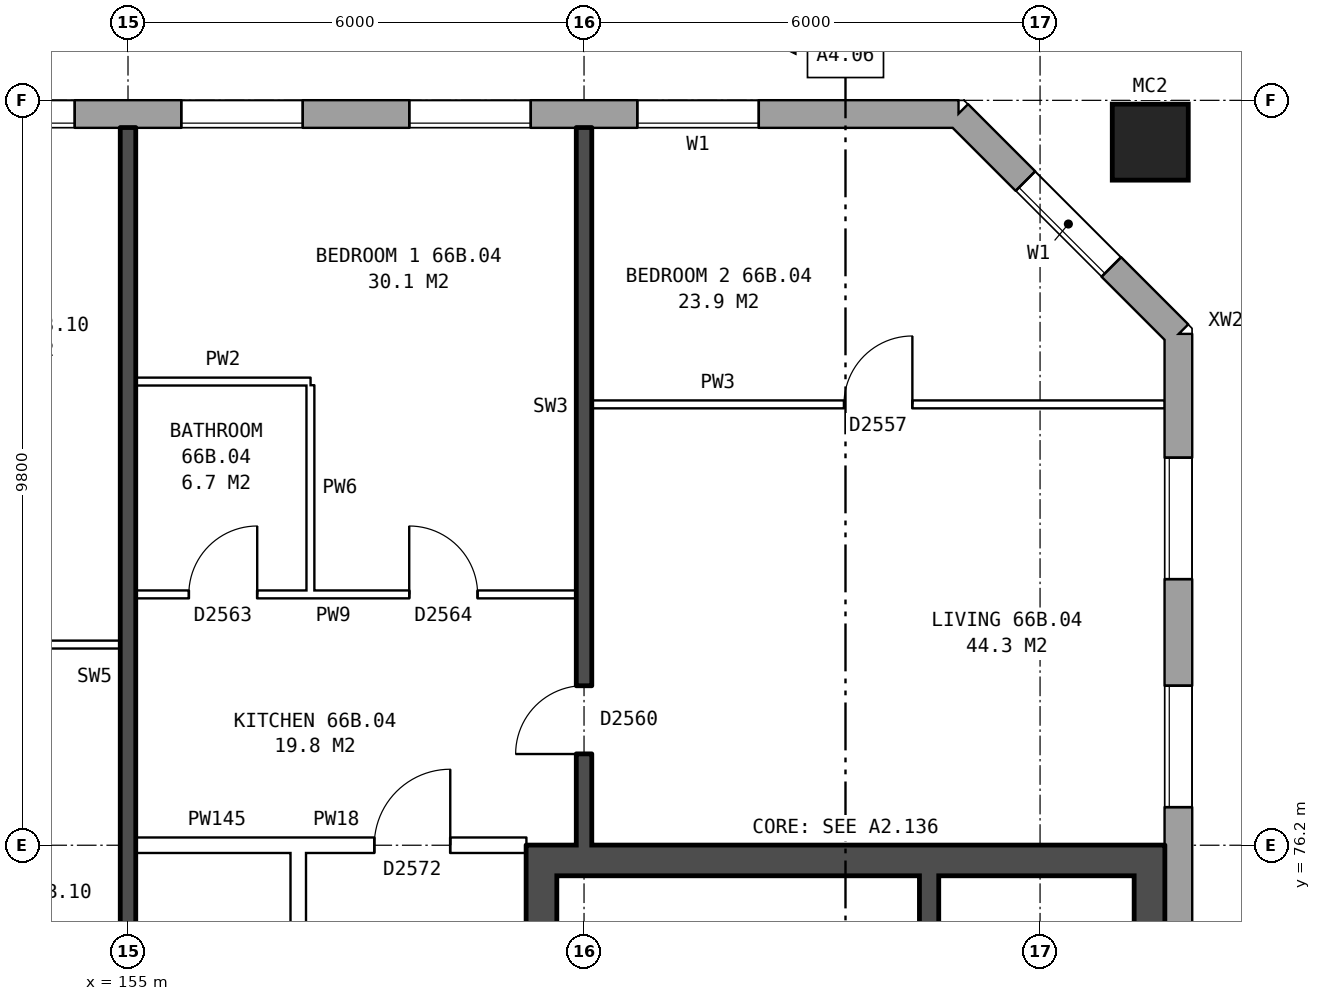
"""IFC4 building model, lengths in metres.
Left out: names, types, materials, properties, quantities, classifications, styles, units other than length and angle.
Written with IfcOpenShell. Run it as: python <this file> out.ifc"""

import sys

from ifc_helpers import new_model, si_unit, direction, frame, frame_2d, origin, origin_2d, place, context, subcontext, project, spatial, rectangle, hollow_rectangle, extrude, element, fill, save


model = new_model("IFC4")
c1 = context("Model", 3, precision=1e-05, world=origin(), true_north=direction((0.0, 1.0)))
c2 = subcontext(c1, "Body", "Model", "MODEL_VIEW")
j1 = project(units=[si_unit("LENGTHUNIT", "METRE"), si_unit("PLANEANGLEUNIT", "RADIAN")], contexts=[c1])
p1 = place(None, origin())
s1 = spatial("IfcSite", under=j1, at=p1, CompositionType="ELEMENT")
p2 = place(p1, origin())
s2 = spatial("IfcBuilding", under=s1, at=p2, CompositionType="ELEMENT")
p3 = place(p2, frame((0.0, 0.0, 233.8)))
s3 = spatial("IfcBuildingStorey", under=s2, at=p3, CompositionType="ELEMENT", Elevation=233.8)
p4 = place(p3, frame((168.45, 85.45, 0.0), z_axis=(0.0, 0.0, 1.0), x_axis=(1.0, 0.0, 0.0)))
e1 = element("IfcColumn", 1, at=p4, inside=s3, PredefinedType="COLUMN", context=c2, shape_type="SweptSolid", body=[
    extrude(hollow_rectangle(XDim=1.0, YDim=1.0, WallThickness=0.055, at=origin_2d()), origin(), (0.0, 0.0, 1.0), 3.1),
])
p5 = place(p3, frame((168.82, 57.075, 0.0), z_axis=(0.0, 0.0, 1.0), x_axis=(0.0, 1.0, 0.0)))
e2 = element("IfcWall", 2, at=p5, inside=s3, PredefinedType="STANDARD", context=c2, shape_type="SweptSolid", body=[
    extrude(rectangle(XDim=25.851, YDim=0.36, at=frame_2d((12.925, 0.0))), origin(), (0.0, 0.0, 1.0), 2.85),
])
p6 = place(p5, frame((1.625, 0.0, 0.8)))
e3 = element("IfcOpeningElement", 3, at=p6, cuts=e2, PredefinedType="OPENING", context=c2, shape_type="SweptSolid", body=[
    extrude(rectangle(XDim=1.6, YDim=1.8, at=frame_2d((0.8, 0.9))), frame((0.0, 0.19, 0.0), z_axis=(0.0, -1.0, 0.0), x_axis=(1.0, 0.0, 0.0)), (0.0, 0.0, 1.0), 0.38),
])
p7 = place(p5, frame((4.625, 0.0, 0.8)))
e4 = element("IfcOpeningElement", 4, at=p7, cuts=e2, PredefinedType="OPENING", context=c2, shape_type="SweptSolid", body=[
    extrude(rectangle(XDim=1.6, YDim=1.8, at=frame_2d((0.8, 0.9))), frame((0.0, 0.19, 0.0), z_axis=(0.0, -1.0, 0.0), x_axis=(1.0, 0.0, 0.0)), (0.0, 0.0, 1.0), 0.38),
])
p8 = place(p5, frame((19.625, 0.0, 0.8)))
e5 = element("IfcOpeningElement", 5, at=p8, cuts=e2, PredefinedType="OPENING", context=c2, shape_type="SweptSolid", body=[
    extrude(rectangle(XDim=1.6, YDim=1.8, at=frame_2d((0.8, 0.9))), frame((0.0, 0.19, 0.0), z_axis=(0.0, -1.0, 0.0), x_axis=(1.0, 0.0, 0.0)), (0.0, 0.0, 1.0), 0.38),
])
p9 = place(p5, frame((22.625, 0.0, 0.8)))
e6 = element("IfcOpeningElement", 6, at=p9, cuts=e2, PredefinedType="OPENING", context=c2, shape_type="SweptSolid", body=[
    extrude(rectangle(XDim=1.6, YDim=1.8, at=frame_2d((0.8, 0.9))), frame((0.0, 0.19, 0.0), z_axis=(0.0, -1.0, 0.0), x_axis=(1.0, 0.0, 0.0)), (0.0, 0.0, 1.0), 0.38),
])
p10 = place(p3, frame((168.82, 82.925, 0.0), z_axis=(0.0, 0.0, 1.0), x_axis=(-0.707106781187, 0.707106781187, 0.0)))
e7 = element("IfcWall", 7, at=p10, inside=s3, PredefinedType="STANDARD", context=c2, shape_type="SweptSolid", body=[
    extrude(rectangle(XDim=4.094, YDim=0.36, at=frame_2d((2.047, 0.0))), origin(), (0.0, 0.0, 1.0), 2.85),
])
p11 = place(p10, frame((1.247, 0.0, 0.8)))
e8 = element("IfcOpeningElement", 8, at=p11, cuts=e7, PredefinedType="OPENING", context=c2, shape_type="SweptSolid", body=[
    extrude(rectangle(XDim=1.6, YDim=1.8, at=frame_2d((0.8, 0.9))), frame((0.0, 0.19, 0.0), z_axis=(0.0, -1.0, 0.0), x_axis=(1.0, 0.0, 0.0)), (0.0, 0.0, 1.0), 0.38),
])
p12 = place(p3, frame((165.925, 85.82, 0.0), z_axis=(0.0, 0.0, 1.0), x_axis=(-1.0, 0.0, 0.0)))
e9 = element("IfcWall", 9, at=p12, inside=s3, PredefinedType="STANDARD", context=c2, shape_type="SweptSolid", body=[
    extrude(rectangle(XDim=33.875, YDim=0.36, at=frame_2d((16.938, 0.0))), origin(), (0.0, 0.0, 1.0), 2.85),
])
p13 = place(p12, frame((2.625, 0.0, 0.8)))
e10 = element("IfcOpeningElement", 10, at=p13, cuts=e9, PredefinedType="OPENING", context=c2, shape_type="SweptSolid", body=[
    extrude(rectangle(XDim=1.6, YDim=1.8, at=frame_2d((0.8, 0.9))), frame((0.0, 0.19, 0.0), z_axis=(0.0, -1.0, 0.0), x_axis=(1.0, 0.0, 0.0)), (0.0, 0.0, 1.0), 0.38),
])
p14 = place(p12, frame((5.625, 0.0, 0.8)))
e11 = element("IfcOpeningElement", 11, at=p14, cuts=e9, PredefinedType="OPENING", context=c2, shape_type="SweptSolid", body=[
    extrude(rectangle(XDim=1.6, YDim=1.8, at=frame_2d((0.8, 0.9))), frame((0.0, 0.19, 0.0), z_axis=(0.0, -1.0, 0.0), x_axis=(1.0, 0.0, 0.0)), (0.0, 0.0, 1.0), 0.38),
])
p15 = place(p12, frame((8.625, 0.0, 0.8)))
e12 = element("IfcOpeningElement", 12, at=p15, cuts=e9, PredefinedType="OPENING", context=c2, shape_type="SweptSolid", body=[
    extrude(rectangle(XDim=1.6, YDim=1.8, at=frame_2d((0.8, 0.9))), frame((0.0, 0.19, 0.0), z_axis=(0.0, -1.0, 0.0), x_axis=(1.0, 0.0, 0.0)), (0.0, 0.0, 1.0), 0.38),
])
p16 = place(p12, frame((11.625, 0.0, 0.8)))
e13 = element("IfcOpeningElement", 13, at=p16, cuts=e9, PredefinedType="OPENING", context=c2, shape_type="SweptSolid", body=[
    extrude(rectangle(XDim=1.6, YDim=1.8, at=frame_2d((0.8, 0.9))), frame((0.0, 0.19, 0.0), z_axis=(0.0, -1.0, 0.0), x_axis=(1.0, 0.0, 0.0)), (0.0, 0.0, 1.0), 0.38),
])
p17 = place(p12, frame((14.075, 0.0, 1.45)))
e14 = element("IfcOpeningElement", 14, at=p17, cuts=e9, PredefinedType="OPENING", context=c2, shape_type="SweptSolid", body=[
    extrude(rectangle(XDim=0.6, YDim=0.9, at=frame_2d((0.3, 0.45))), frame((0.0, 0.19, 0.0), z_axis=(0.0, -1.0, 0.0), x_axis=(1.0, 0.0, 0.0)), (0.0, 0.0, 1.0), 0.38),
])
p18 = place(p12, frame((17.625, 0.0, 0.8)))
e15 = element("IfcOpeningElement", 15, at=p18, cuts=e9, PredefinedType="OPENING", context=c2, shape_type="SweptSolid", body=[
    extrude(rectangle(XDim=1.6, YDim=1.8, at=frame_2d((0.8, 0.9))), frame((0.0, 0.19, 0.0), z_axis=(0.0, -1.0, 0.0), x_axis=(1.0, 0.0, 0.0)), (0.0, 0.0, 1.0), 0.38),
])
p19 = place(p12, frame((20.625, 0.0, 0.8)))
e16 = element("IfcOpeningElement", 16, at=p19, cuts=e9, PredefinedType="OPENING", context=c2, shape_type="SweptSolid", body=[
    extrude(rectangle(XDim=1.6, YDim=1.8, at=frame_2d((0.8, 0.9))), frame((0.0, 0.19, 0.0), z_axis=(0.0, -1.0, 0.0), x_axis=(1.0, 0.0, 0.0)), (0.0, 0.0, 1.0), 0.38),
])
p20 = place(p12, frame((23.625, 0.0, 0.8)))
e17 = element("IfcOpeningElement", 17, at=p20, cuts=e9, PredefinedType="OPENING", context=c2, shape_type="SweptSolid", body=[
    extrude(rectangle(XDim=1.6, YDim=1.8, at=frame_2d((0.8, 0.9))), frame((0.0, 0.19, 0.0), z_axis=(0.0, -1.0, 0.0), x_axis=(1.0, 0.0, 0.0)), (0.0, 0.0, 1.0), 0.38),
])
p21 = place(p12, frame((26.625, 0.0, 0.8)))
e18 = element("IfcOpeningElement", 18, at=p21, cuts=e9, PredefinedType="OPENING", context=c2, shape_type="SweptSolid", body=[
    extrude(rectangle(XDim=1.6, YDim=1.8, at=frame_2d((0.8, 0.9))), frame((0.0, 0.19, 0.0), z_axis=(0.0, -1.0, 0.0), x_axis=(1.0, 0.0, 0.0)), (0.0, 0.0, 1.0), 0.38),
])
p22 = place(p12, frame((29.625, 0.0, 0.8)))
e19 = element("IfcOpeningElement", 19, at=p22, cuts=e9, PredefinedType="OPENING", context=c2, shape_type="SweptSolid", body=[
    extrude(rectangle(XDim=1.6, YDim=1.8, at=frame_2d((0.8, 0.9))), frame((0.0, 0.19, 0.0), z_axis=(0.0, -1.0, 0.0), x_axis=(1.0, 0.0, 0.0)), (0.0, 0.0, 1.0), 0.38),
])
p23 = place(p12, frame((15.575, 0.0, 0.15)))
e20 = element("IfcOpeningElement", 20, at=p23, cuts=e9, PredefinedType="OPENING", context=c2, shape_type="SweptSolid", body=[
    extrude(rectangle(XDim=0.6, YDim=0.9, at=frame_2d((0.3, 0.45))), frame((0.0, 0.19, 0.0), z_axis=(0.0, -1.0, 0.0), x_axis=(1.0, 0.0, 0.0)), (0.0, 0.0, 1.0), 0.38),
])
p24 = place(p3, frame((160.44, 76.2, 0.0), z_axis=(0.0, 0.0, 1.0), x_axis=(0.0, -1.0, 0.0)))
e21 = element("IfcWall", 21, at=p24, inside=s3, PredefinedType="SHEAR", context=c2, shape_type="SweptSolid", body=[
    extrude(rectangle(XDim=12.4, YDim=0.4, at=frame_2d((6.2, 0.0))), origin(), (0.0, 0.0, 1.0), 2.85),
])
p25 = place(p24, frame((1.325, 0.0, 0.0)))
e22 = element("IfcOpeningElement", 22, at=p25, cuts=e21, PredefinedType="OPENING", context=c2, shape_type="SweptSolid", body=[
    extrude(rectangle(XDim=1.1, YDim=2.1, at=frame_2d((0.55, 1.05))), frame((0.0, 0.21, 0.0), z_axis=(0.0, -1.0, 0.0), x_axis=(1.0, 0.0, 0.0)), (0.0, 0.0, 1.0), 0.42),
])
p26 = place(p24, frame((4.825, 0.0, 0.0)))
e23 = element("IfcOpeningElement", 23, at=p26, cuts=e21, PredefinedType="OPENING", context=c2, shape_type="SweptSolid", body=[
    extrude(rectangle(XDim=0.85, YDim=2.1, at=frame_2d((0.425, 1.05))), frame((0.0, 0.21, 0.0), z_axis=(0.0, -1.0, 0.0), x_axis=(1.0, 0.0, 0.0)), (0.0, 0.0, 1.0), 0.42),
])
p27 = place(p24, frame((9.9, 0.0, 0.0)))
e24 = element("IfcOpeningElement", 24, at=p27, cuts=e21, PredefinedType="OPENING", context=c2, shape_type="SweptSolid", body=[
    extrude(rectangle(XDim=1.1, YDim=2.1, at=frame_2d((0.55, 1.05))), frame((0.0, 0.21, 0.0), z_axis=(0.0, -1.0, 0.0), x_axis=(1.0, 0.0, 0.0)), (0.0, 0.0, 1.0), 0.42),
])
p28 = place(p24, frame((8.125, 0.0, 0.0)))
e25 = element("IfcOpeningElement", 25, at=p28, cuts=e21, PredefinedType="OPENING", context=c2, shape_type="SweptSolid", body=[
    extrude(rectangle(XDim=0.85, YDim=2.1, at=frame_2d((0.425, 1.05))), frame((0.0, 0.21, 0.0), z_axis=(0.0, -1.0, 0.0), x_axis=(1.0, 0.0, 0.0)), (0.0, 0.0, 1.0), 0.42),
])
p29 = place(p3, frame((168.44, 76.2, 0.0), z_axis=(0.0, 0.0, 1.0), x_axis=(0.0, -1.0, 0.0)))
e26 = element("IfcWall", 26, at=p29, inside=s3, PredefinedType="SHEAR", context=c2, shape_type="SweptSolid", body=[
    extrude(rectangle(XDim=12.4, YDim=0.4, at=frame_2d((6.2, 0.0))), origin(), (0.0, 0.0, 1.0), 2.85),
])
p30 = place(p3, frame((160.64, 76.0, 0.0), z_axis=(0.0, 0.0, 1.0), x_axis=(1.0, 0.0, 0.0)))
e27 = element("IfcWall", 27, at=p30, inside=s3, PredefinedType="SHEAR", context=c2, shape_type="SweptSolid", body=[
    extrude(rectangle(XDim=7.6, YDim=0.4, at=frame_2d((3.8, 0.0))), origin(), (0.0, 0.0, 1.0), 2.85),
])
p31 = place(p3, frame((165.54, 75.8, 0.0), z_axis=(0.0, 0.0, 1.0), x_axis=(0.0, -1.0, 0.0)))
e28 = element("IfcWall", 28, at=p31, inside=s3, PredefinedType="SHEAR", context=c2, shape_type="SweptSolid", body=[
    extrude(rectangle(XDim=6.925, YDim=0.25, at=frame_2d((3.462, 0.0))), origin(), (0.0, 0.0, 1.0), 2.85),
])
p32 = place(p3, frame((157.24, 63.9, 0.0), z_axis=(0.0, 0.0, 1.0), x_axis=(0.0, 1.0, 0.0)))
e29 = element("IfcWall", 29, at=p32, inside=s3, PredefinedType="PARTITIONING", context=c2, shape_type="SweptSolid", body=[
    extrude(rectangle(XDim=12.2, YDim=0.2, at=frame_2d((6.1, 0.0))), origin(), (0.0, 0.0, 1.0), 2.85),
])
p33 = place(p32, frame((5.1, 0.0, 0.0)))
e30 = element("IfcOpeningElement", 30, at=p33, cuts=e29, PredefinedType="OPENING", context=c2, shape_type="SweptSolid", body=[
    extrude(rectangle(XDim=2.0, YDim=2.1, at=frame_2d((1.0, 1.05))), frame((0.0, 0.11, 0.0), z_axis=(0.0, -1.0, 0.0), x_axis=(1.0, 0.0, 0.0)), (0.0, 0.0, 1.0), 0.22),
])
p34 = place(p3, frame((155.1, 76.2, 0.0), z_axis=(0.0, 0.0, 1.0), x_axis=(1.0, 0.0, 0.0)))
e31 = element("IfcWall", 31, at=p34, inside=s3, PredefinedType="PARTITIONING", context=c2, shape_type="SweptSolid", body=[
    extrude(rectangle(XDim=2.14, YDim=0.2, at=frame_2d((1.07, 0.0))), origin(), (0.0, 0.0, 1.0), 2.85),
])
p35 = place(p3, frame((157.24, 76.2, 0.0), z_axis=(0.0, 0.0, 1.0), x_axis=(1.0, 0.0, 0.0)))
e32 = element("IfcWall", 32, at=p35, inside=s3, PredefinedType="PARTITIONING", context=c2, shape_type="SweptSolid", body=[
    extrude(rectangle(XDim=3.0, YDim=0.2, at=frame_2d((1.5, 0.0))), origin(), (0.0, 0.0, 1.0), 2.85),
])
p36 = place(p35, frame((1.0, 0.0, 0.0)))
e33 = element("IfcOpeningElement", 33, at=p36, cuts=e32, PredefinedType="OPENING", context=c2, shape_type="SweptSolid", body=[
    extrude(rectangle(XDim=1.0, YDim=2.1, at=frame_2d((0.5, 1.05))), frame((0.0, 0.11, 0.0), z_axis=(0.0, -1.0, 0.0), x_axis=(1.0, 0.0, 0.0)), (0.0, 0.0, 1.0), 0.22),
])
p37 = place(p3, frame((152.0, 78.84, 0.0), z_axis=(0.0, 0.0, 1.0), x_axis=(1.0, 0.0, 0.0)))
e34 = element("IfcWall", 34, at=p37, inside=s3, PredefinedType="PARTITIONING", context=c2, shape_type="SweptSolid", body=[
    extrude(rectangle(XDim=2.9, YDim=0.1, at=frame_2d((1.45, 0.0))), origin(), (0.0, 0.0, 1.0), 2.85),
])
p38 = place(p37, frame((1.0, 0.0, 0.0)))
e35 = element("IfcOpeningElement", 35, at=p38, cuts=e34, PredefinedType="OPENING", context=c2, shape_type="SweptSolid", body=[
    extrude(rectangle(XDim=0.9, YDim=2.1, at=frame_2d((0.45, 1.05))), frame((0.0, 0.06, 0.0), z_axis=(0.0, -1.0, 0.0), x_axis=(1.0, 0.0, 0.0)), (0.0, 0.0, 1.0), 0.12),
])
p39 = place(p3, frame((155.1, 79.5, 0.0), z_axis=(0.0, 0.0, 1.0), x_axis=(1.0, 0.0, 0.0)))
e36 = element("IfcWall", 36, at=p39, inside=s3, PredefinedType="PARTITIONING", context=c2, shape_type="SweptSolid", body=[
    extrude(rectangle(XDim=5.8, YDim=0.1, at=frame_2d((2.9, 0.0))), origin(), (0.0, 0.0, 1.0), 2.85),
])
p40 = place(p39, frame((3.6, 0.0, 0.0)))
e37 = element("IfcOpeningElement", 37, at=p40, cuts=e36, PredefinedType="OPENING", context=c2, shape_type="SweptSolid", body=[
    extrude(rectangle(XDim=0.9, YDim=2.1, at=frame_2d((0.45, 1.05))), frame((0.0, 0.06, 0.0), z_axis=(0.0, -1.0, 0.0), x_axis=(1.0, 0.0, 0.0)), (0.0, 0.0, 1.0), 0.12),
])
p41 = place(p39, frame((0.7, 0.0, 0.0)))
e38 = element("IfcOpeningElement", 38, at=p41, cuts=e36, PredefinedType="OPENING", context=c2, shape_type="SweptSolid", body=[
    extrude(rectangle(XDim=0.9, YDim=2.1, at=frame_2d((0.45, 1.05))), frame((0.0, 0.06, 0.0), z_axis=(0.0, -1.0, 0.0), x_axis=(1.0, 0.0, 0.0)), (0.0, 0.0, 1.0), 0.12),
])
p42 = place(p3, frame((161.1, 82.0, 0.0), z_axis=(0.0, 0.0, 1.0), x_axis=(1.0, 0.0, 0.0)))
e39 = element("IfcWall", 39, at=p42, inside=s3, PredefinedType="PARTITIONING", context=c2, shape_type="SweptSolid", body=[
    extrude(rectangle(XDim=7.54, YDim=0.1, at=frame_2d((3.77, 0.0))), origin(), (0.0, 0.0, 1.0), 2.85),
])
p43 = place(p42, frame((3.32, 0.0, 0.0)))
e40 = element("IfcOpeningElement", 40, at=p43, cuts=e39, PredefinedType="OPENING", context=c2, shape_type="SweptSolid", body=[
    extrude(rectangle(XDim=0.9, YDim=2.1, at=frame_2d((0.45, 1.05))), frame((0.0, 0.06, 0.0), z_axis=(0.0, -1.0, 0.0), x_axis=(1.0, 0.0, 0.0)), (0.0, 0.0, 1.0), 0.12),
])
p44 = place(p3, frame((155.1, 82.3, 0.0), z_axis=(0.0, 0.0, 1.0), x_axis=(1.0, 0.0, 0.0)))
e41 = element("IfcWall", 41, at=p44, inside=s3, PredefinedType="PARTITIONING", context=c2, shape_type="SweptSolid", body=[
    extrude(rectangle(XDim=2.3, YDim=0.1, at=frame_2d((1.15, 0.0))), origin(), (0.0, 0.0, 1.0), 2.85),
])
p45 = place(p3, frame((155.0, 71.2, 0.0), z_axis=(0.0, 0.0, 1.0), x_axis=(0.0, 1.0, 0.0)))
e42 = element("IfcWall", 42, at=p45, inside=s3, PredefinedType="SOLIDWALL", context=c2, shape_type="SweptSolid", body=[
    extrude(rectangle(XDim=14.44, YDim=0.2, at=frame_2d((7.22, 0.0))), origin(), (0.0, 0.0, 1.0), 2.85),
])
p46 = place(p3, frame((157.4, 79.55, 0.0), z_axis=(0.0, 0.0, 1.0), x_axis=(0.0, 1.0, 0.0)))
e43 = element("IfcWall", 43, at=p46, inside=s3, PredefinedType="PARTITIONING", context=c2, shape_type="SweptSolid", body=[
    extrude(rectangle(XDim=2.7, YDim=0.1, at=frame_2d((1.35, 0.0))), origin(), (0.0, 0.0, 1.0), 2.85),
])
p47 = place(p3, frame((161.0, 76.2, 0.0), z_axis=(0.0, 0.0, 1.0), x_axis=(0.0, 1.0, 0.0)))
e44 = element("IfcWall", 44, at=p47, inside=s3, PredefinedType="SOLIDWALL", context=c2, shape_type="SweptSolid", body=[
    extrude(rectangle(XDim=9.44, YDim=0.2, at=frame_2d((4.72, 0.0))), origin(), (0.0, 0.0, 1.0), 2.85),
])
p48 = place(p47, frame((1.2, 0.0, 0.0)))
e45 = element("IfcOpeningElement", 45, at=p48, cuts=e44, PredefinedType="OPENING", context=c2, shape_type="SweptSolid", body=[
    extrude(rectangle(XDim=0.9, YDim=2.1, at=frame_2d((0.45, 1.05))), frame((0.0, 0.11, 0.0), z_axis=(0.0, -1.0, 0.0), x_axis=(1.0, 0.0, 0.0)), (0.0, 0.0, 1.0), 0.22),
])
p49 = place(p8, origin())
e46 = element("IfcWindow", 46, at=p49, inside=s3, PartitioningType="SINGLE_PANEL", PredefinedType="WINDOW", context=c2, shape_type="SweptSolid", body=[
    extrude(rectangle(XDim=1.6, YDim=1.8, at=frame_2d((0.8, 0.9))), frame((0.0, 0.15, 0.0), z_axis=(0.0, -1.0, 0.0), x_axis=(1.0, 0.0, 0.0)), (0.0, 0.0, 1.0), 0.06),
])
fill(e5, e46)
p50 = place(p9, origin())
e47 = element("IfcWindow", 47, at=p50, inside=s3, PartitioningType="SINGLE_PANEL", PredefinedType="WINDOW", context=c2, shape_type="SweptSolid", body=[
    extrude(rectangle(XDim=1.6, YDim=1.8, at=frame_2d((0.8, 0.9))), frame((0.0, 0.15, 0.0), z_axis=(0.0, -1.0, 0.0), x_axis=(1.0, 0.0, 0.0)), (0.0, 0.0, 1.0), 0.06),
])
fill(e6, e47)
p51 = place(p11, origin())
e48 = element("IfcWindow", 48, at=p51, inside=s3, PartitioningType="SINGLE_PANEL", PredefinedType="WINDOW", context=c2, shape_type="SweptSolid", body=[
    extrude(rectangle(XDim=1.6, YDim=1.8, at=frame_2d((0.8, 0.9))), frame((0.0, 0.15, 0.0), z_axis=(0.0, -1.0, 0.0), x_axis=(1.0, 0.0, 0.0)), (0.0, 0.0, 1.0), 0.06),
])
fill(e8, e48)
p52 = place(p13, origin())
e49 = element("IfcWindow", 49, at=p52, inside=s3, PartitioningType="SINGLE_PANEL", PredefinedType="WINDOW", context=c2, shape_type="SweptSolid", body=[
    extrude(rectangle(XDim=1.6, YDim=1.8, at=frame_2d((0.8, 0.9))), frame((0.0, 0.15, 0.0), z_axis=(0.0, -1.0, 0.0), x_axis=(1.0, 0.0, 0.0)), (0.0, 0.0, 1.0), 0.06),
])
fill(e10, e49)
p53 = place(p14, origin())
e50 = element("IfcWindow", 50, at=p53, inside=s3, PartitioningType="SINGLE_PANEL", PredefinedType="WINDOW", context=c2, shape_type="SweptSolid", body=[
    extrude(rectangle(XDim=1.6, YDim=1.8, at=frame_2d((0.8, 0.9))), frame((0.0, 0.15, 0.0), z_axis=(0.0, -1.0, 0.0), x_axis=(1.0, 0.0, 0.0)), (0.0, 0.0, 1.0), 0.06),
])
fill(e11, e50)
p54 = place(p15, origin())
e51 = element("IfcWindow", 51, at=p54, inside=s3, PartitioningType="SINGLE_PANEL", PredefinedType="WINDOW", context=c2, shape_type="SweptSolid", body=[
    extrude(rectangle(XDim=1.6, YDim=1.8, at=frame_2d((0.8, 0.9))), frame((0.0, 0.15, 0.0), z_axis=(0.0, -1.0, 0.0), x_axis=(1.0, 0.0, 0.0)), (0.0, 0.0, 1.0), 0.06),
])
fill(e12, e51)
p55 = place(p16, origin())
e52 = element("IfcWindow", 52, at=p55, inside=s3, PartitioningType="SINGLE_PANEL", PredefinedType="WINDOW", context=c2, shape_type="SweptSolid", body=[
    extrude(rectangle(XDim=1.6, YDim=1.8, at=frame_2d((0.8, 0.9))), frame((0.0, 0.15, 0.0), z_axis=(0.0, -1.0, 0.0), x_axis=(1.0, 0.0, 0.0)), (0.0, 0.0, 1.0), 0.06),
])
fill(e13, e52)
p56 = place(p40, origin())
e53 = element("IfcDoor", 53, at=p56, inside=s3, OperationType="SINGLE_SWING_LEFT", PredefinedType="DOOR", context=c2, shape_type="SweptSolid", body=[
    extrude(rectangle(XDim=0.9, YDim=2.1, at=frame_2d((0.45, 1.05))), frame((0.0, 0.025, 0.0), z_axis=(0.0, -1.0, 0.0), x_axis=(1.0, 0.0, 0.0)), (0.0, 0.0, 1.0), 0.05),
])
fill(e37, e53)
p57 = place(p43, origin())
e54 = element("IfcDoor", 54, at=p57, inside=s3, OperationType="SINGLE_SWING_RIGHT", PredefinedType="DOOR", context=c2, shape_type="SweptSolid", body=[
    extrude(rectangle(XDim=0.9, YDim=2.1, at=frame_2d((0.45, 1.05))), frame((0.0, 0.025, 0.0), z_axis=(0.0, -1.0, 0.0), x_axis=(1.0, 0.0, 0.0)), (0.0, 0.0, 1.0), 0.05),
])
fill(e40, e54)
p58 = place(p36, origin())
e55 = element("IfcDoor", 55, at=p58, inside=s3, OperationType="SINGLE_SWING_RIGHT", PredefinedType="DOOR", context=c2, shape_type="SweptSolid", body=[
    extrude(rectangle(XDim=1.0, YDim=2.1, at=frame_2d((0.5, 1.05))), frame((0.0, 0.025, 0.0), z_axis=(0.0, -1.0, 0.0), x_axis=(1.0, 0.0, 0.0)), (0.0, 0.0, 1.0), 0.05),
])
fill(e33, e55)
p59 = place(p48, origin())
e56 = element("IfcDoor", 56, at=p59, inside=s3, OperationType="SINGLE_SWING_LEFT", PredefinedType="DOOR", context=c2, shape_type="SweptSolid", body=[
    extrude(rectangle(XDim=0.9, YDim=2.1, at=frame_2d((0.45, 1.05))), frame((0.0, 0.025, 0.0), z_axis=(0.0, -1.0, 0.0), x_axis=(1.0, 0.0, 0.0)), (0.0, 0.0, 1.0), 0.05),
])
fill(e45, e56)
p60 = place(p41, origin())
e57 = element("IfcDoor", 57, at=p60, inside=s3, OperationType="SINGLE_SWING_RIGHT", PredefinedType="DOOR", context=c2, shape_type="SweptSolid", body=[
    extrude(rectangle(XDim=0.9, YDim=2.1, at=frame_2d((0.45, 1.05))), frame((0.0, 0.025, 0.0), z_axis=(0.0, -1.0, 0.0), x_axis=(1.0, 0.0, 0.0)), (0.0, 0.0, 1.0), 0.05),
])
fill(e38, e57)
save(model, sys.argv[1])
